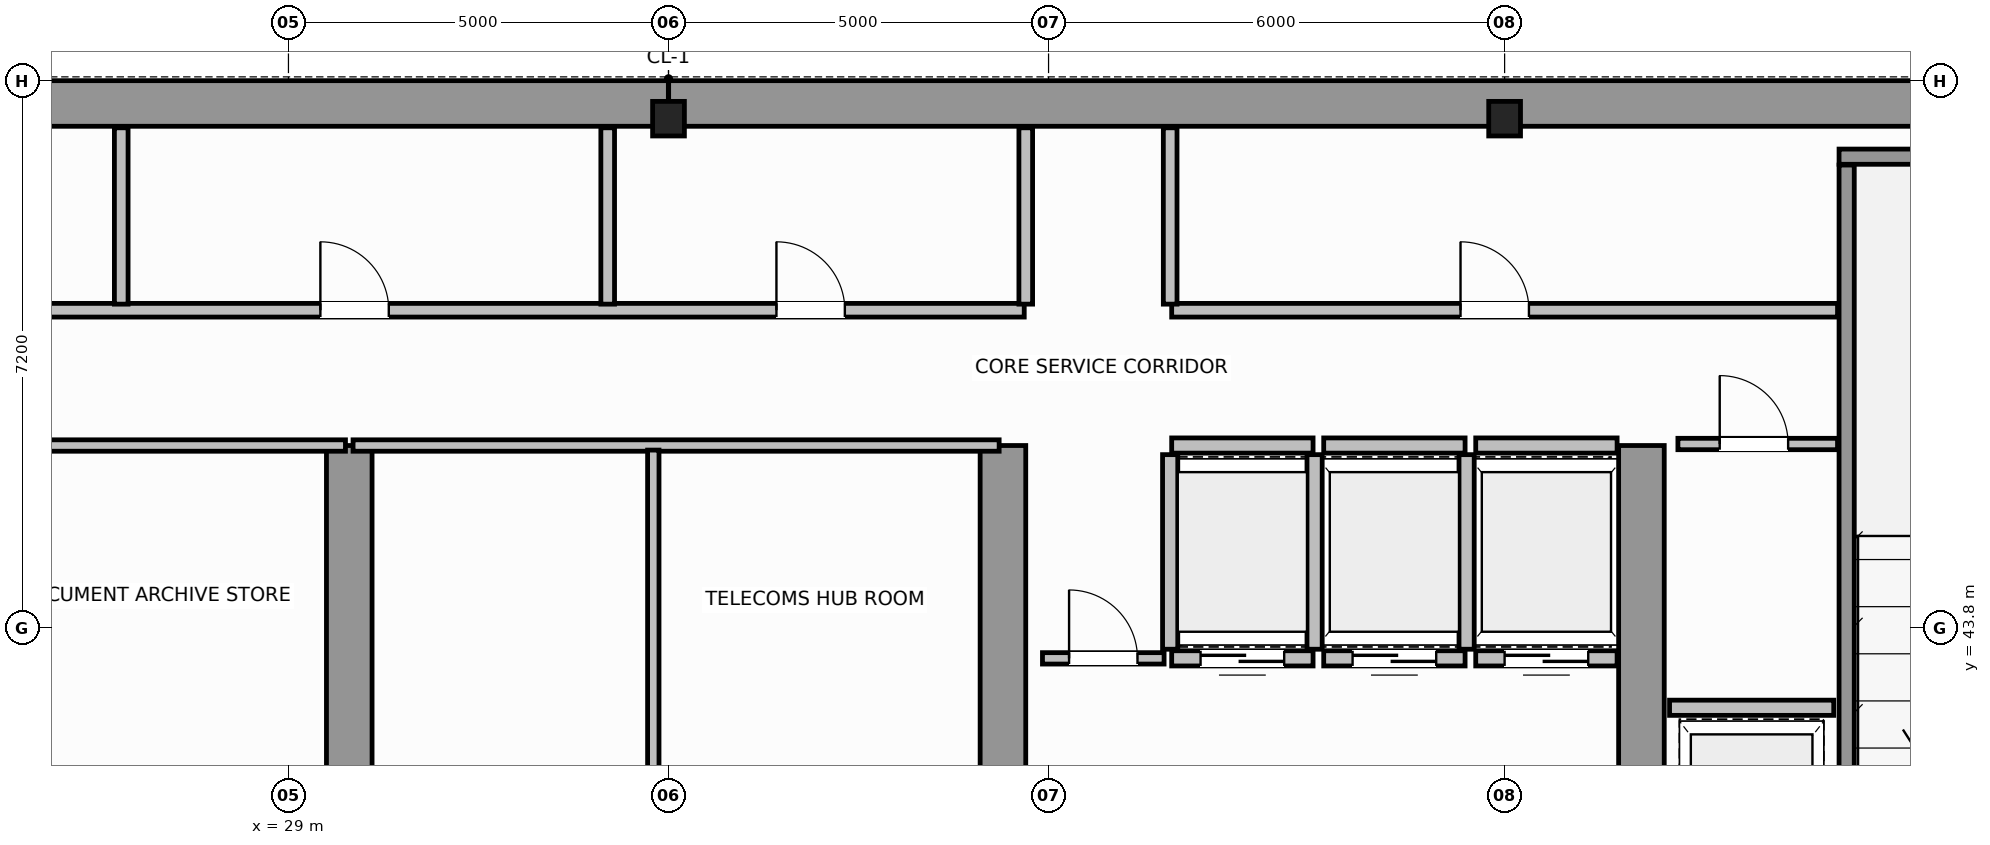
"""IFC4 building model, lengths in metres.
Left out: names, types, materials, properties, quantities, classifications, styles, units other than length and angle.
Written with IfcOpenShell. Run it as: python <this file> out.ifc"""

import sys

from ifc_helpers import new_model, si_unit, direction, frame, frame_2d, origin, origin_2d, place, context, subcontext, project, spatial, rectangle, i_section, extrude, source, transform, mapped, element, fill, save


model = new_model("IFC4")
c1 = context("Model", 3, precision=1e-05, world=origin(), true_north=direction((0.0, 1.0)))
c2 = subcontext(c1, "Body", "Model", "MODEL_VIEW")
j1 = project(units=[si_unit("LENGTHUNIT", "METRE"), si_unit("PLANEANGLEUNIT", "RADIAN")], contexts=[c1])
p1 = place(None, origin())
s1 = spatial("IfcSite", under=j1, at=p1, CompositionType="ELEMENT")
p2 = place(p1, origin())
s2 = spatial("IfcBuilding", under=s1, at=p2, CompositionType="ELEMENT")
p3 = place(p2, frame((0.0, 0.0, 242.2)))
s3 = spatial("IfcBuildingStorey", under=s2, at=p3, CompositionType="ELEMENT", Elevation=242.2)
m1 = source(origin(), c2, "Body", "SweptSolid", [
    extrude(i_section(OverallWidth=0.418, OverallDepth=0.455, WebThickness=0.042, FlangeThickness=0.058, FilletRadius=0.015, at=origin_2d()), origin(), (0.0, 0.0, 1.0), 3.8),
])
for number, where, z_axis, x_axis in (
    (1, (34.0, 50.5, 0.0), (0.0, 0.0, 1.0), (1.0, 0.0, 0.0)),
    (2, (45.0, 50.5, 0.0), (0.0, 0.0, 1.0), (1.0, 0.0, 0.0)),
):
    element("IfcColumn", number, at=place(p3, frame(where, z_axis=z_axis, x_axis=x_axis)), inside=s3, PredefinedType="COLUMN", context=c2, shape_type="MappedRepresentation", body=[
        mapped(m1, transform((0.0, 0.0, 0.0), scale=1.0)),
    ])
for number, where, z_axis, x_axis in (
    (3, (14.304, 50.7, 0.0), (0.0, 0.0, 1.0), (1.0, 0.0, 0.0)),
    (4, (34.002, 50.7, 0.0), (0.0, 0.0, 1.0), (1.0, 0.0, 0.0)),
):
    element("IfcWall", number, at=place(p3, frame(where, z_axis=z_axis, x_axis=x_axis)), inside=s3, PredefinedType="SHEAR", context=c2, shape_type="SweptSolid", body=[
        extrude(rectangle(XDim=19.694, YDim=0.6, at=frame_2d((9.847, 0.0))), origin(), (0.0, 0.0, 1.0), 3.8),
    ])
for number, where, z_axis, x_axis in (
    (5, (29.8, 36.82, 0.0), (0.0, 0.0, 1.0), (0.0, 1.0, 0.0)),
    (6, (38.4, 36.82, 0.0), (0.0, 0.0, 1.0), (0.0, 1.0, 0.0)),
    (7, (46.8, 36.82, 0.0), (0.0, 0.0, 1.0), (0.0, 1.0, 0.0)),
):
    element("IfcWall", number, at=place(p3, frame(where, z_axis=z_axis, x_axis=x_axis)), inside=s3, PredefinedType="SHEAR", context=c2, shape_type="SweptSolid", body=[
        extrude(rectangle(XDim=9.38, YDim=0.6, at=frame_2d((4.69, 0.0))), origin(), (0.0, 0.0, 1.0), 3.8),
    ])
p4 = place(p3, frame((49.4, 50.0, 0.0), z_axis=(0.0, 0.0, 1.0), x_axis=(1.0, 0.0, 0.0)))
e8 = element("IfcWall", 8, at=p4, inside=s3, PredefinedType="SOLIDWALL", context=c2, shape_type="SweptSolid", body=[
    extrude(rectangle(XDim=4.3, YDim=0.2, at=frame_2d((2.15, 0.0))), origin(), (0.0, 0.0, 1.0), 3.8),
])
p5 = place(p3, frame((49.5, 39.96, 0.0), z_axis=(0.0, 0.0, 1.0), x_axis=(0.0, 1.0, 0.0)))
e9 = element("IfcWall", 9, at=p5, inside=s3, PredefinedType="SOLIDWALL", context=c2, shape_type="SweptSolid", body=[
    extrude(rectangle(XDim=9.93, YDim=0.2, at=frame_2d((4.965, 0.0))), origin(), (0.0, 0.0, 1.0), 3.8),
])
p6 = place(p3, frame((40.62, 43.4, 0.0), z_axis=(0.0, 0.0, 1.0), x_axis=(1.0, 0.0, 0.0)))
e10 = element("IfcWall", 10, at=p6, inside=s3, PredefinedType="SOLIDWALL", context=c2, shape_type="SweptSolid", body=[
    extrude(rectangle(XDim=1.86, YDim=0.2, at=frame_2d((0.93, 0.0))), origin(), (0.0, 0.0, 1.0), 3.58),
])
p7 = place(p6, frame((0.38, 0.0, 0.0)))
e11 = element("IfcOpeningElement", 11, at=p7, cuts=e10, PredefinedType="OPENING", context=c2, shape_type="SweptSolid", body=[
    extrude(rectangle(XDim=1.1, YDim=2.15, at=frame_2d((0.55, 1.075))), frame((0.0, 0.11, 0.0), z_axis=(0.0, -1.0, 0.0), x_axis=(1.0, 0.0, 0.0)), (0.0, 0.0, 1.0), 0.22),
])
p8 = place(p3, frame((40.62, 46.2, 0.0), z_axis=(0.0, 0.0, 1.0), x_axis=(1.0, 0.0, 0.0)))
e12 = element("IfcWall", 12, at=p8, inside=s3, PredefinedType="SOLIDWALL", context=c2, shape_type="SweptSolid", body=[
    extrude(rectangle(XDim=1.86, YDim=0.2, at=frame_2d((0.93, 0.0))), origin(), (0.0, 0.0, 1.0), 3.58),
])
for number, where, z_axis, x_axis in (
    (13, (40.6, 43.52, 0.0), (0.0, 0.0, 1.0), (0.0, 1.0, 0.0)),
    (14, (42.5, 43.52, 0.0), (0.0, 0.0, 1.0), (0.0, 1.0, 0.0)),
):
    element("IfcWall", number, at=place(p3, frame(where, z_axis=z_axis, x_axis=x_axis)), inside=s3, PredefinedType="SOLIDWALL", context=c2, shape_type="SweptSolid", body=[
        extrude(rectangle(XDim=2.56, YDim=0.2, at=frame_2d((1.28, 0.0))), origin(), (0.0, 0.0, 1.0), 3.58),
    ])
p9 = place(p3, frame((42.62, 43.4, 0.0), z_axis=(0.0, 0.0, 1.0), x_axis=(1.0, 0.0, 0.0)))
e15 = element("IfcWall", 15, at=p9, inside=s3, PredefinedType="SOLIDWALL", context=c2, shape_type="SweptSolid", body=[
    extrude(rectangle(XDim=1.86, YDim=0.2, at=frame_2d((0.93, 0.0))), origin(), (0.0, 0.0, 1.0), 3.58),
])
p10 = place(p9, frame((0.38, 0.0, 0.0)))
e16 = element("IfcOpeningElement", 16, at=p10, cuts=e15, PredefinedType="OPENING", context=c2, shape_type="SweptSolid", body=[
    extrude(rectangle(XDim=1.1, YDim=2.15, at=frame_2d((0.55, 1.075))), frame((0.0, 0.11, 0.0), z_axis=(0.0, -1.0, 0.0), x_axis=(1.0, 0.0, 0.0)), (0.0, 0.0, 1.0), 0.22),
])
p11 = place(p3, frame((42.62, 46.2, 0.0), z_axis=(0.0, 0.0, 1.0), x_axis=(1.0, 0.0, 0.0)))
e17 = element("IfcWall", 17, at=p11, inside=s3, PredefinedType="SOLIDWALL", context=c2, shape_type="SweptSolid", body=[
    extrude(rectangle(XDim=1.86, YDim=0.2, at=frame_2d((0.93, 0.0))), origin(), (0.0, 0.0, 1.0), 3.58),
])
p12 = place(p3, frame((44.5, 43.52, 0.0), z_axis=(0.0, 0.0, 1.0), x_axis=(0.0, 1.0, 0.0)))
e18 = element("IfcWall", 18, at=p12, inside=s3, PredefinedType="SOLIDWALL", context=c2, shape_type="SweptSolid", body=[
    extrude(rectangle(XDim=2.56, YDim=0.2, at=frame_2d((1.28, 0.0))), origin(), (0.0, 0.0, 1.0), 3.58),
])
p13 = place(p3, frame((44.62, 43.4, 0.0), z_axis=(0.0, 0.0, 1.0), x_axis=(1.0, 0.0, 0.0)))
e19 = element("IfcWall", 19, at=p13, inside=s3, PredefinedType="SOLIDWALL", context=c2, shape_type="SweptSolid", body=[
    extrude(rectangle(XDim=1.86, YDim=0.2, at=frame_2d((0.93, 0.0))), origin(), (0.0, 0.0, 1.0), 3.58),
])
p14 = place(p13, frame((0.38, 0.0, 0.0)))
e20 = element("IfcOpeningElement", 20, at=p14, cuts=e19, PredefinedType="OPENING", context=c2, shape_type="SweptSolid", body=[
    extrude(rectangle(XDim=1.1, YDim=2.15, at=frame_2d((0.55, 1.075))), frame((0.0, 0.11, 0.0), z_axis=(0.0, -1.0, 0.0), x_axis=(1.0, 0.0, 0.0)), (0.0, 0.0, 1.0), 0.22),
])
p15 = place(p3, frame((44.62, 46.2, 0.0), z_axis=(0.0, 0.0, 1.0), x_axis=(1.0, 0.0, 0.0)))
e21 = element("IfcWall", 21, at=p15, inside=s3, PredefinedType="SOLIDWALL", context=c2, shape_type="SweptSolid", body=[
    extrude(rectangle(XDim=1.86, YDim=0.2, at=frame_2d((0.93, 0.0))), origin(), (0.0, 0.0, 1.0), 3.58),
])
p16 = place(p3, frame((47.17, 42.75, 0.0), z_axis=(0.0, 0.0, 1.0), x_axis=(1.0, 0.0, 0.0)))
e22 = element("IfcWall", 22, at=p16, inside=s3, PredefinedType="SOLIDWALL", context=c2, shape_type="SweptSolid", body=[
    extrude(rectangle(XDim=2.16, YDim=0.2, at=frame_2d((1.08, 0.0))), origin(), (0.0, 0.0, 1.0), 3.58),
])
for number, where, z_axis, x_axis in (
    (23, (21.25, 46.2, 0.0), (0.0, 0.0, 1.0), (1.0, 0.0, 0.0)),
    (24, (29.85, 46.2, 0.0), (0.0, 0.0, 1.0), (1.0, 0.0, 0.0)),
):
    element("IfcWall", number, at=place(p3, frame(where, z_axis=z_axis, x_axis=x_axis)), inside=s3, PredefinedType="PARTITIONING", context=c2, shape_type="SweptSolid", body=[
        extrude(rectangle(XDim=8.5, YDim=0.15, at=frame_2d((4.25, 0.0))), origin(), (0.0, 0.0, 1.0), 3.58),
    ])
p17 = place(p3, frame((33.8, 36.56, 0.0), z_axis=(0.0, 0.0, 1.0), x_axis=(0.0, 1.0, 0.0)))
e25 = element("IfcWall", 25, at=p17, inside=s3, PredefinedType="PARTITIONING", context=c2, shape_type="SweptSolid", body=[
    extrude(rectangle(XDim=9.58, YDim=0.15, at=frame_2d((4.79, 0.0))), origin(), (0.0, 0.0, 1.0), 3.58),
])
p18 = place(p17, frame((4.2, 0.0, 0.0)))
e26 = element("IfcOpeningElement", 26, at=p18, cuts=e25, PredefinedType="OPENING", context=c2, shape_type="SweptSolid", body=[
    extrude(rectangle(XDim=0.9, YDim=2.1, at=frame_2d((0.45, 1.05))), frame((0.0, 0.085, 0.0), z_axis=(0.0, -1.0, 0.0), x_axis=(1.0, 0.0, 0.0)), (0.0, 0.0, 1.0), 0.17),
])
p19 = place(p3, frame((47.28, 46.22, 0.0), z_axis=(0.0, 0.0, 1.0), x_axis=(1.0, 0.0, 0.0)))
e27 = element("IfcWall", 27, at=p19, inside=s3, PredefinedType="PARTITIONING", context=c2, shape_type="SweptSolid", body=[
    extrude(rectangle(XDim=2.1, YDim=0.15, at=frame_2d((1.05, 0.0))), origin(), (0.0, 0.0, 1.0), 3.58),
])
p20 = place(p19, frame((0.55, 0.0, 0.0)))
e28 = element("IfcOpeningElement", 28, at=p20, cuts=e27, PredefinedType="OPENING", context=c2, shape_type="SweptSolid", body=[
    extrude(rectangle(XDim=0.9, YDim=2.1, at=frame_2d((0.45, 1.05))), frame((0.0, 0.085, 0.0), z_axis=(0.0, -1.0, 0.0), x_axis=(1.0, 0.0, 0.0)), (0.0, 0.0, 1.0), 0.17),
])
p21 = place(p3, frame((38.92, 43.4, 0.0), z_axis=(0.0, 0.0, 1.0), x_axis=(1.0, 0.0, 0.0)))
e29 = element("IfcWall", 29, at=p21, inside=s3, PredefinedType="PARTITIONING", context=c2, shape_type="SweptSolid", body=[
    extrude(rectangle(XDim=1.6, YDim=0.15, at=frame_2d((0.8, 0.0))), origin(), (0.0, 0.0, 1.0), 3.58),
])
p22 = place(p21, frame((0.35, 0.0, 0.0)))
e30 = element("IfcOpeningElement", 30, at=p22, cuts=e29, PredefinedType="OPENING", context=c2, shape_type="SweptSolid", body=[
    extrude(rectangle(XDim=0.9, YDim=2.1, at=frame_2d((0.45, 1.05))), frame((0.0, 0.085, 0.0), z_axis=(0.0, -1.0, 0.0), x_axis=(1.0, 0.0, 0.0)), (0.0, 0.0, 1.0), 0.17),
])
p23 = place(p3, frame((18.62, 47.98, 0.0), z_axis=(0.0, 0.0, 1.0), x_axis=(1.0, 0.0, 0.0)))
e31 = element("IfcWall", 31, at=p23, inside=s3, PredefinedType="PLUMBINGWALL", context=c2, shape_type="SweptSolid", body=[
    extrude(rectangle(XDim=20.06, YDim=0.18, at=frame_2d((10.03, 0.0))), origin(), (0.0, 0.0, 1.0), 3.58),
])
p24 = place(p23, frame((3.5, 0.0, 0.0)))
e32 = element("IfcOpeningElement", 32, at=p24, cuts=e31, PredefinedType="OPENING", context=c2, shape_type="SweptSolid", body=[
    extrude(rectangle(XDim=0.9, YDim=2.15, at=frame_2d((0.45, 1.075))), frame((0.0, 0.1, 0.0), z_axis=(0.0, -1.0, 0.0), x_axis=(1.0, 0.0, 0.0)), (0.0, 0.0, 1.0), 0.2),
])
p25 = place(p23, frame((10.8, 0.0, 0.0)))
e33 = element("IfcOpeningElement", 33, at=p25, cuts=e31, PredefinedType="OPENING", context=c2, shape_type="SweptSolid", body=[
    extrude(rectangle(XDim=0.9, YDim=2.15, at=frame_2d((0.45, 1.075))), frame((0.0, 0.1, 0.0), z_axis=(0.0, -1.0, 0.0), x_axis=(1.0, 0.0, 0.0)), (0.0, 0.0, 1.0), 0.2),
])
p26 = place(p23, frame((16.8, 0.0, 0.0)))
e34 = element("IfcOpeningElement", 34, at=p26, cuts=e31, PredefinedType="OPENING", context=c2, shape_type="SweptSolid", body=[
    extrude(rectangle(XDim=0.9, YDim=2.15, at=frame_2d((0.45, 1.075))), frame((0.0, 0.1, 0.0), z_axis=(0.0, -1.0, 0.0), x_axis=(1.0, 0.0, 0.0)), (0.0, 0.0, 1.0), 0.2),
])
p27 = place(p3, frame((40.62, 47.98, 0.0), z_axis=(0.0, 0.0, 1.0), x_axis=(1.0, 0.0, 0.0)))
e35 = element("IfcWall", 35, at=p27, inside=s3, PredefinedType="PLUMBINGWALL", context=c2, shape_type="SweptSolid", body=[
    extrude(rectangle(XDim=8.76, YDim=0.18, at=frame_2d((4.38, 0.0))), origin(), (0.0, 0.0, 1.0), 3.58),
])
p28 = place(p27, frame((3.8, 0.0, 0.0)))
e36 = element("IfcOpeningElement", 36, at=p28, cuts=e35, PredefinedType="OPENING", context=c2, shape_type="SweptSolid", body=[
    extrude(rectangle(XDim=0.9, YDim=2.15, at=frame_2d((0.45, 1.075))), frame((0.0, 0.1, 0.0), z_axis=(0.0, -1.0, 0.0), x_axis=(1.0, 0.0, 0.0)), (0.0, 0.0, 1.0), 0.2),
])
for number, where, z_axis, x_axis in (
    (37, (26.8, 48.06, 0.0), (0.0, 0.0, 1.0), (0.0, 1.0, 0.0)),
    (38, (33.2, 48.06, 0.0), (0.0, 0.0, 1.0), (0.0, 1.0, 0.0)),
    (39, (38.7, 48.06, 0.0), (0.0, 0.0, 1.0), (0.0, 1.0, 0.0)),
    (40, (40.6, 48.06, 0.0), (0.0, 0.0, 1.0), (0.0, 1.0, 0.0)),
):
    element("IfcWall", number, at=place(p3, frame(where, z_axis=z_axis, x_axis=x_axis)), inside=s3, PredefinedType="PLUMBINGWALL", context=c2, shape_type="SweptSolid", body=[
        extrude(rectangle(XDim=2.32, YDim=0.18, at=frame_2d((1.16, 0.0))), origin(), (0.0, 0.0, 1.0), 3.58),
    ])
m2 = source(origin(), c2, "Body", "SweptSolid", [
    extrude(rectangle(XDim=1.1, YDim=2.15, at=frame_2d((0.55, 1.075))), frame((0.0, 0.025, 0.0), z_axis=(0.0, -1.0, 0.0), x_axis=(1.0, 0.0, 0.0)), (0.0, 0.0, 1.0), 0.05),
])
p29 = place(p7, origin())
e41 = element("IfcDoor", 41, at=p29, inside=s3, OperationType="DOUBLE_DOOR_SLIDING", PredefinedType="DOOR", context=c2, shape_type="MappedRepresentation", body=[
    mapped(m2, transform((0.0, 0.0, 0.0), scale=1.0)),
])
fill(e11, e41)
p30 = place(p10, origin())
e42 = element("IfcDoor", 42, at=p30, inside=s3, OperationType="DOUBLE_DOOR_SLIDING", PredefinedType="DOOR", context=c2, shape_type="MappedRepresentation", body=[
    mapped(m2, transform((0.0, 0.0, 0.0), scale=1.0)),
])
fill(e16, e42)
p31 = place(p14, origin())
e43 = element("IfcDoor", 43, at=p31, inside=s3, OperationType="DOUBLE_DOOR_SLIDING", PredefinedType="DOOR", context=c2, shape_type="MappedRepresentation", body=[
    mapped(m2, transform((0.0, 0.0, 0.0), scale=1.0)),
])
fill(e20, e43)
m3 = source(origin(), c2, "Body", "SweptSolid", [
    extrude(rectangle(XDim=0.9, YDim=2.1, at=frame_2d((0.45, 1.05))), frame((0.0, 0.025, 0.0), z_axis=(0.0, -1.0, 0.0), x_axis=(1.0, 0.0, 0.0)), (0.0, 0.0, 1.0), 0.05),
])
p32 = place(p20, origin())
e44 = element("IfcDoor", 44, at=p32, inside=s3, OperationType="SINGLE_SWING_RIGHT", PredefinedType="DOOR", context=c2, shape_type="MappedRepresentation", body=[
    mapped(m3, transform((0.0, 0.0, 0.0), scale=1.0)),
])
fill(e28, e44)
p33 = place(p22, origin())
e45 = element("IfcDoor", 45, at=p33, inside=s3, OperationType="SINGLE_SWING_LEFT", PredefinedType="DOOR", context=c2, shape_type="MappedRepresentation", body=[
    mapped(m3, transform((0.0, 0.0, 0.0), scale=1.0)),
])
fill(e30, e45)
m4 = source(origin(), c2, "Body", "SweptSolid", [
    extrude(rectangle(XDim=0.9, YDim=2.15, at=frame_2d((0.45, 1.075))), frame((0.0, 0.025, 0.0), z_axis=(0.0, -1.0, 0.0), x_axis=(1.0, 0.0, 0.0)), (0.0, 0.0, 1.0), 0.05),
])
p34 = place(p25, origin())
e46 = element("IfcDoor", 46, at=p34, inside=s3, OperationType="SINGLE_SWING_RIGHT", PredefinedType="DOOR", context=c2, shape_type="MappedRepresentation", body=[
    mapped(m4, transform((0.0, 0.0, 0.0), scale=1.0)),
])
fill(e33, e46)
p35 = place(p26, origin())
e47 = element("IfcDoor", 47, at=p35, inside=s3, OperationType="SINGLE_SWING_LEFT", PredefinedType="DOOR", context=c2, shape_type="MappedRepresentation", body=[
    mapped(m4, transform((0.0, 0.0, 0.0), scale=1.0)),
])
fill(e34, e47)
p36 = place(p28, origin())
e48 = element("IfcDoor", 48, at=p36, inside=s3, OperationType="SINGLE_SWING_RIGHT", PredefinedType="DOOR", context=c2, shape_type="MappedRepresentation", body=[
    mapped(m4, transform((0.0, 0.0, 0.0), scale=1.0)),
])
fill(e36, e48)
save(model, sys.argv[1])
